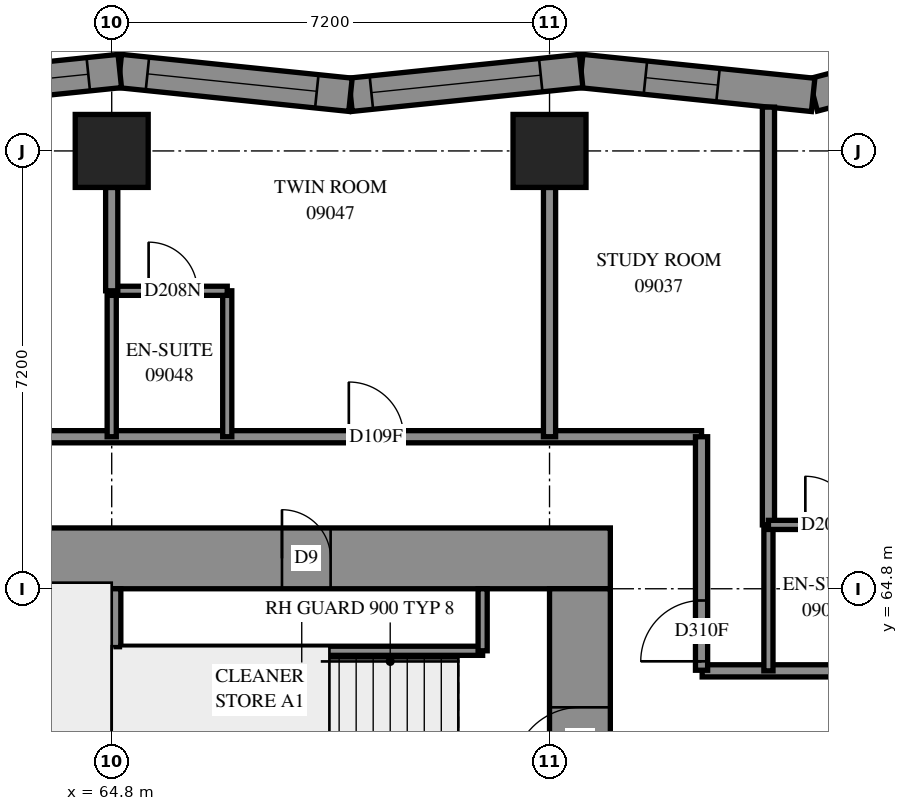
"""IFC4 building model, lengths in metres.
Left out: names, types, materials, properties, quantities, classifications, styles, units other than length and angle.
Written with IfcOpenShell. Run it as: python <this file> out.ifc"""

import sys

from ifc_helpers import new_model, si_unit, direction, frame, frame_2d, origin, origin_2d, place, context, subcontext, project, spatial, polyline, rectangle, outline, extrude, element, fill, save


model = new_model("IFC4")
c1 = context("Model", 3, precision=1e-05, world=origin(), true_north=direction((0.0, 1.0)))
c2 = subcontext(c1, "Body", "Model", "MODEL_VIEW")
j1 = project(units=[si_unit("LENGTHUNIT", "METRE"), si_unit("PLANEANGLEUNIT", "RADIAN")], contexts=[c1])
p1 = place(None, origin())
s1 = spatial("IfcSite", under=j1, at=p1, CompositionType="ELEMENT")
p2 = place(p1, origin())
s2 = spatial("IfcBuilding", under=s1, at=p2, CompositionType="ELEMENT")
p3 = place(p2, frame((0.0, 0.0, 37.2)))
s3 = spatial("IfcBuildingStorey", under=s2, at=p3, CompositionType="ELEMENT", Elevation=37.2)
for number, where, z_axis, x_axis in (
    (1, (64.8, 72.0, 0.0), (0.0, 0.0, 1.0), (1.0, 0.0, 0.0)),
    (2, (72.0, 72.0, 0.0), (0.0, 0.0, 1.0), (1.0, 0.0, 0.0)),
):
    element("IfcColumn", number, at=place(p3, frame(where, z_axis=z_axis, x_axis=x_axis)), inside=s3, PredefinedType="COLUMN", context=c2, shape_type="SweptSolid", body=[
        extrude(rectangle(XDim=1.2, YDim=1.2, at=origin_2d()), origin(), (0.0, 0.0, 1.0), 3.1),
    ])
p4 = place(p3, frame((56.6, 65.3, -0.3), z_axis=(0.0, 0.0, 1.0), x_axis=(1.0, 0.0, 0.0)))
e3 = element("IfcWall", 3, at=p4, inside=s3, PredefinedType="SHEAR", context=c2, shape_type="SweptSolid", body=[
    extrude(rectangle(XDim=16.4, YDim=1.0, at=frame_2d((8.2, 0.0))), origin(), (0.0, 0.0, 1.0), 2.7),
])
p5 = place(p4, frame((11.0, 0.0, 0.3)))
e4 = element("IfcOpeningElement", 4, at=p5, cuts=e3, PredefinedType="OPENING", context=c2, shape_type="SweptSolid", body=[
    extrude(rectangle(XDim=0.8, YDim=2.1, at=frame_2d((0.4, 1.05))), frame((0.0, 0.51, 0.0), z_axis=(0.0, -1.0, 0.0), x_axis=(1.0, 0.0, 0.0)), (0.0, 0.0, 1.0), 1.02),
])
p6 = place(p3, frame((72.5, 50.4, -0.3), z_axis=(0.0, 0.0, 1.0), x_axis=(0.0, 1.0, 0.0)))
e5 = element("IfcWall", 5, at=p6, inside=s3, PredefinedType="SHEAR", context=c2, shape_type="SweptSolid", body=[
    extrude(rectangle(XDim=14.4, YDim=1.0, at=frame_2d((7.2, 0.0))), origin(), (0.0, 0.0, 1.0), 2.7),
])
p7 = place(p6, frame((4.55, 0.0, 0.3)))
e6 = element("IfcOpeningElement", 6, at=p7, cuts=e5, PredefinedType="OPENING", context=c2, shape_type="SweptSolid", body=[
    extrude(rectangle(XDim=1.1, YDim=2.1, at=frame_2d((0.55, 1.05))), frame((0.0, 0.51, 0.0), z_axis=(0.0, -1.0, 0.0), x_axis=(1.0, 0.0, 0.0)), (0.0, 0.0, 1.0), 1.02),
])
p8 = place(p6, frame((11.35, 0.0, 0.3)))
e7 = element("IfcOpeningElement", 7, at=p8, cuts=e5, PredefinedType="OPENING", context=c2, shape_type="SweptSolid", body=[
    extrude(rectangle(XDim=1.1, YDim=2.1, at=frame_2d((0.55, 1.05))), frame((0.0, 0.51, 0.0), z_axis=(0.0, -1.0, 0.0), x_axis=(1.0, 0.0, 0.0)), (0.0, 0.0, 1.0), 1.02),
])
p9 = place(p3, frame((64.8, 60.6, 0.0), z_axis=(0.0, 0.0, 1.0), x_axis=(0.0, 1.0, 0.0)))
e8 = element("IfcWall", 8, at=p9, inside=s3, PredefinedType="SOLIDWALL", context=c2, shape_type="SweptSolid", body=[
    extrude(rectangle(XDim=4.2, YDim=0.3, at=frame_2d((2.1, 0.0))), origin(), (0.0, 0.0, 1.0), 3.1),
])
p10 = place(p3, frame((79.97, 73.871, 0.0), z_axis=(0.0, 0.0, 1.0), x_axis=(-0.9675284554, -0.2527621176, 0.0)))
e9 = element("IfcWall", 9, at=p10, inside=s3, PredefinedType="SOLIDWALL", context=c2, shape_type="SweptSolid", body=[
    extrude(outline(polyline([(-0.214, -0.275), (3.707, -0.275), (3.807, 0.275), (0.214, 0.275), (-0.214, -0.275)])), origin(), (0.0, 0.0, 1.0), 3.1),
])
p11 = place(p10, frame((1.576, 0.0, 0.5)))
e10 = element("IfcOpeningElement", 10, at=p11, cuts=e9, PredefinedType="OPENING", context=c2, shape_type="SweptSolid", body=[
    extrude(rectangle(XDim=1.2, YDim=2.45, at=frame_2d((0.6, 1.225))), frame((0.0, 0.285, 0.0), z_axis=(0.0, -1.0, 0.0), x_axis=(1.0, 0.0, 0.0)), (0.0, 0.0, 1.0), 0.57),
])
p12 = place(p3, frame((76.335, 72.921, 0.0), z_axis=(0.0, 0.0, 1.0), x_axis=(-0.9947305582, 0.1025237367, 0.0)))
e11 = element("IfcWall", 11, at=p12, inside=s3, PredefinedType="SOLIDWALL", context=c2, shape_type="SweptSolid", body=[
    extrude(outline(polyline([(0.05, -0.275), (3.864, -0.275), (3.807, 0.275), (-0.05, 0.275), (0.05, -0.275)])), origin(), (0.0, 0.0, 1.0), 3.1),
])
p13 = place(p12, frame((1.573, 0.0, 0.5)))
e12 = element("IfcOpeningElement", 12, at=p13, cuts=e11, PredefinedType="OPENING", context=c2, shape_type="SweptSolid", body=[
    extrude(rectangle(XDim=1.2, YDim=2.45, at=frame_2d((0.6, 1.225))), frame((0.0, 0.285, 0.0), z_axis=(0.0, -1.0, 0.0), x_axis=(1.0, 0.0, 0.0)), (0.0, 0.0, 1.0), 0.57),
])
p14 = place(p3, frame((72.52, 73.314, 0.0), z_axis=(0.0, 0.0, 1.0), x_axis=(-0.9947306832, -0.1025225234, 0.0)))
e13 = element("IfcWall", 13, at=p14, inside=s3, PredefinedType="SOLIDWALL", context=c2, shape_type="SweptSolid", body=[
    extrude(outline(polyline([(-0.028, -0.275), (3.785, -0.275), (3.842, 0.275), (0.028, 0.275), (-0.028, -0.275)])), origin(), (0.0, 0.0, 1.0), 3.1),
])
p15 = place(p14, frame((0.668, 0.0, 0.5)))
e14 = element("IfcOpeningElement", 14, at=p15, cuts=e13, PredefinedType="OPENING", context=c2, shape_type="SweptSolid", body=[
    extrude(rectangle(XDim=2.8, YDim=2.45, at=frame_2d((1.4, 1.225))), frame((0.0, 0.285, 0.0), z_axis=(0.0, -1.0, 0.0), x_axis=(1.0, 0.0, 0.0)), (0.0, 0.0, 1.0), 0.57),
])
p16 = place(p3, frame((68.727, 72.924, 0.0), z_axis=(0.0, 0.0, 1.0), x_axis=(-0.9947306832, 0.1025225234, 0.0)))
e15 = element("IfcWall", 15, at=p16, inside=s3, PredefinedType="SOLIDWALL", context=c2, shape_type="SweptSolid", body=[
    extrude(outline(polyline([(0.028, -0.275), (3.842, -0.275), (3.785, 0.275), (-0.028, 0.275), (0.028, -0.275)])), origin(), (0.0, 0.0, 1.0), 3.1),
])
p17 = place(p16, frame((0.557, 0.0, 0.5)))
e16 = element("IfcOpeningElement", 16, at=p17, cuts=e15, PredefinedType="OPENING", context=c2, shape_type="SweptSolid", body=[
    extrude(rectangle(XDim=2.8, YDim=2.45, at=frame_2d((1.4, 1.225))), frame((0.0, 0.285, 0.0), z_axis=(0.0, -1.0, 0.0), x_axis=(1.0, 0.0, 0.0)), (0.0, 0.0, 1.0), 0.57),
])
p18 = place(p3, frame((64.933, 73.314, 0.0), z_axis=(0.0, 0.0, 1.0), x_axis=(-0.9947304076, -0.1025251975, 0.0)))
e17 = element("IfcWall", 17, at=p18, inside=s3, PredefinedType="SOLIDWALL", context=c2, shape_type="SweptSolid", body=[
    extrude(outline(polyline([(-0.028, -0.275), (3.785, -0.275), (3.842, 0.275), (0.028, 0.275), (-0.028, -0.275)])), origin(), (0.0, 0.0, 1.0), 3.1),
])
p19 = place(p18, frame((0.521, 0.0, 0.5)))
e18 = element("IfcOpeningElement", 18, at=p19, cuts=e17, PredefinedType="OPENING", context=c2, shape_type="SweptSolid", body=[
    extrude(rectangle(XDim=2.8, YDim=2.45, at=frame_2d((1.4, 1.225))), frame((0.0, 0.285, 0.0), z_axis=(0.0, -1.0, 0.0), x_axis=(1.0, 0.0, 0.0)), (0.0, 0.0, 1.0), 0.57),
])
p20 = place(p3, frame((64.95, 63.78, 0.0), z_axis=(0.0, 0.0, 1.0), x_axis=(1.0, 0.0, 0.0)))
e19 = element("IfcWall", 19, at=p20, inside=s3, PredefinedType="PARTITIONING", context=c2, shape_type="SweptSolid", body=[
    extrude(rectangle(XDim=5.95, YDim=0.15, at=frame_2d((2.975, 0.0))), origin(), (0.0, 0.0, 1.0), 3.1),
])
p21 = place(p3, frame((70.9, 63.78, 0.0), z_axis=(0.0, 0.0, 1.0), x_axis=(0.0, 1.0, 0.0)))
e20 = element("IfcWall", 20, at=p21, inside=s3, PredefinedType="PARTITIONING", context=c2, shape_type="SweptSolid", body=[
    extrude(rectangle(XDim=1.02, YDim=0.15, at=frame_2d((0.51, 0.0))), origin(), (0.0, 0.0, 1.0), 3.1),
])
p22 = place(p3, frame((55.1, 67.3, 0.0), z_axis=(0.0, 0.0, 1.0), x_axis=(1.0, 0.0, 0.0)))
e21 = element("IfcWall", 21, at=p22, inside=s3, PredefinedType="PARTITIONING", context=c2, shape_type="SweptSolid", body=[
    extrude(rectangle(XDim=19.4, YDim=0.2, at=frame_2d((9.7, 0.0))), origin(), (0.0, 0.0, 1.0), 3.1),
])
p23 = place(p22, frame((6.399, 0.0, 0.0)))
e22 = element("IfcOpeningElement", 22, at=p23, cuts=e21, PredefinedType="OPENING", context=c2, shape_type="SweptSolid", body=[
    extrude(rectangle(XDim=0.9, YDim=2.1, at=frame_2d((0.45, 1.05))), frame((0.0, 0.11, 0.0), z_axis=(0.0, -1.0, 0.0), x_axis=(1.0, 0.0, 0.0)), (0.0, 0.0, 1.0), 0.22),
])
p24 = place(p22, frame((13.599, 0.0, 0.0)))
e23 = element("IfcOpeningElement", 23, at=p24, cuts=e21, PredefinedType="OPENING", context=c2, shape_type="SweptSolid", body=[
    extrude(rectangle(XDim=0.9, YDim=2.1, at=frame_2d((0.45, 1.05))), frame((0.0, 0.11, 0.0), z_axis=(0.0, -1.0, 0.0), x_axis=(1.0, 0.0, 0.0)), (0.0, 0.0, 1.0), 0.22),
])
p25 = place(p3, frame((75.6, 65.85, 0.0), z_axis=(0.0, 0.0, 1.0), x_axis=(0.0, 1.0, 0.0)))
e24 = element("IfcWall", 24, at=p25, inside=s3, PredefinedType="PARTITIONING", context=c2, shape_type="SweptSolid", body=[
    extrude(rectangle(XDim=6.871, YDim=0.2, at=frame_2d((3.435, 0.0))), origin(), (0.0, 0.0, 1.0), 3.1),
])
p26 = place(p3, frame((74.51, 63.45, 0.0), z_axis=(0.0, 0.0, 1.0), x_axis=(1.0, 0.0, 0.0)))
e25 = element("IfcWall", 25, at=p26, inside=s3, PredefinedType="PARTITIONING", context=c2, shape_type="SweptSolid", body=[
    extrude(rectangle(XDim=4.69, YDim=0.2, at=frame_2d((2.345, 0.0))), origin(), (0.0, 0.0, 1.0), 3.1),
])
p27 = place(p26, frame((3.12, 0.0, 0.0)))
e26 = element("IfcOpeningElement", 26, at=p27, cuts=e25, PredefinedType="OPENING", context=c2, shape_type="SweptSolid", body=[
    extrude(rectangle(XDim=0.9, YDim=2.1, at=frame_2d((0.45, 1.05))), frame((0.0, 0.11, 0.0), z_axis=(0.0, -1.0, 0.0), x_axis=(1.0, 0.0, 0.0)), (0.0, 0.0, 1.0), 0.22),
])
p28 = place(p3, frame((72.0, 67.3, 0.0), z_axis=(0.0, 0.0, 1.0), x_axis=(0.0, 1.0, 0.0)))
e27 = element("IfcWall", 27, at=p28, inside=s3, PredefinedType="PARTITIONING", context=c2, shape_type="SweptSolid", body=[
    extrude(rectangle(XDim=4.1, YDim=0.2, at=frame_2d((2.05, 0.0))), origin(), (0.0, 0.0, 1.0), 3.1),
])
p29 = place(p3, frame((74.5, 63.46, 0.0), z_axis=(0.0, 0.0, 1.0), x_axis=(0.0, 1.0, 0.0)))
e28 = element("IfcWall", 28, at=p29, inside=s3, PredefinedType="PARTITIONING", context=c2, shape_type="SweptSolid", body=[
    extrude(rectangle(XDim=3.84, YDim=0.2, at=frame_2d((1.92, 0.0))), origin(), (0.0, 0.0, 1.0), 3.1),
])
p30 = place(p29, frame((0.147, 0.0, 0.0)))
e29 = element("IfcOpeningElement", 29, at=p30, cuts=e28, PredefinedType="OPENING", context=c2, shape_type="SweptSolid", body=[
    extrude(rectangle(XDim=1.0, YDim=2.1, at=frame_2d((0.5, 1.05))), frame((0.0, 0.11, 0.0), z_axis=(0.0, -1.0, 0.0), x_axis=(1.0, 0.0, 0.0)), (0.0, 0.0, 1.0), 0.22),
])
for number, where, z_axis, x_axis in (
    (30, (66.7, 67.3, 0.0), (0.0, 0.0, 1.0), (0.0, 1.0, 0.0)),
    (31, (64.8, 67.3, 0.0), (0.0, 0.0, 1.0), (0.0, 1.0, 0.0)),
    (32, (75.6, 63.45, 0.0), (0.0, 0.0, 1.0), (0.0, 1.0, 0.0)),
):
    element("IfcWall", number, at=place(p3, frame(where, z_axis=z_axis, x_axis=x_axis)), inside=s3, PredefinedType="PARTITIONING", context=c2, shape_type="SweptSolid", body=[
        extrude(rectangle(XDim=2.4, YDim=0.15, at=frame_2d((1.2, 0.0))), origin(), (0.0, 0.0, 1.0), 3.1),
    ])
p31 = place(p3, frame((75.6, 65.85, 0.0), z_axis=(0.0, 0.0, 1.0), x_axis=(1.0, 0.0, 0.0)))
e33 = element("IfcWall", 33, at=p31, inside=s3, PredefinedType="PARTITIONING", context=c2, shape_type="SweptSolid", body=[
    extrude(rectangle(XDim=1.9, YDim=0.15, at=frame_2d((0.95, 0.0))), origin(), (0.0, 0.0, 1.0), 3.1),
])
p32 = place(p31, frame((0.607, 0.0, 0.0)))
e34 = element("IfcOpeningElement", 34, at=p32, cuts=e33, PredefinedType="OPENING", context=c2, shape_type="SweptSolid", body=[
    extrude(rectangle(XDim=0.8, YDim=2.1, at=frame_2d((0.4, 1.05))), frame((0.0, 0.085, 0.0), z_axis=(0.0, -1.0, 0.0), x_axis=(1.0, 0.0, 0.0)), (0.0, 0.0, 1.0), 0.17),
])
p33 = place(p3, frame((64.8, 69.7, 0.0), z_axis=(0.0, 0.0, 1.0), x_axis=(1.0, 0.0, 0.0)))
e35 = element("IfcWall", 35, at=p33, inside=s3, PredefinedType="PARTITIONING", context=c2, shape_type="SweptSolid", body=[
    extrude(rectangle(XDim=1.9, YDim=0.15, at=frame_2d((0.95, 0.0))), origin(), (0.0, 0.0, 1.0), 3.1),
])
p34 = place(p33, frame((0.607, 0.0, 0.0)))
e36 = element("IfcOpeningElement", 36, at=p34, cuts=e35, PredefinedType="OPENING", context=c2, shape_type="SweptSolid", body=[
    extrude(rectangle(XDim=0.8, YDim=2.1, at=frame_2d((0.4, 1.05))), frame((0.0, 0.085, 0.0), z_axis=(0.0, -1.0, 0.0), x_axis=(1.0, 0.0, 0.0)), (0.0, 0.0, 1.0), 0.17),
])
p35 = place(p3, frame((64.8, 69.7, 0.0), z_axis=(0.0, 0.0, 1.0), x_axis=(0.0, 1.0, 0.0)))
e37 = element("IfcWall", 37, at=p35, inside=s3, PredefinedType="PARTITIONING", context=c2, shape_type="SweptSolid", body=[
    extrude(rectangle(XDim=1.7, YDim=0.2, at=frame_2d((0.85, 0.0))), origin(), (0.0, 0.0, 1.0), 3.1),
])
p36 = place(p13, origin())
e38 = element("IfcWindow", 38, at=p36, inside=s3, PartitioningType="SINGLE_PANEL", PredefinedType="WINDOW", context=c2, shape_type="SweptSolid", body=[
    extrude(rectangle(XDim=1.2, YDim=2.45, at=frame_2d((0.6, 1.225))), frame((0.0, 0.155, 0.0), z_axis=(0.0, -1.0, 0.0), x_axis=(1.0, 0.0, 0.0)), (0.0, 0.0, 1.0), 0.06),
])
fill(e12, e38)
p37 = place(p15, origin())
e39 = element("IfcWindow", 39, at=p37, inside=s3, PartitioningType="SINGLE_PANEL", PredefinedType="WINDOW", context=c2, shape_type="SweptSolid", body=[
    extrude(rectangle(XDim=2.8, YDim=2.45, at=frame_2d((1.4, 1.225))), frame((0.0, 0.155, 0.0), z_axis=(0.0, -1.0, 0.0), x_axis=(1.0, 0.0, 0.0)), (0.0, 0.0, 1.0), 0.06),
])
fill(e14, e39)
p38 = place(p17, origin())
e40 = element("IfcWindow", 40, at=p38, inside=s3, PartitioningType="SINGLE_PANEL", PredefinedType="WINDOW", context=c2, shape_type="SweptSolid", body=[
    extrude(rectangle(XDim=2.8, YDim=2.45, at=frame_2d((1.4, 1.225))), frame((0.0, 0.155, 0.0), z_axis=(0.0, -1.0, 0.0), x_axis=(1.0, 0.0, 0.0)), (0.0, 0.0, 1.0), 0.06),
])
fill(e16, e40)
p39 = place(p19, origin())
e41 = element("IfcWindow", 41, at=p39, inside=s3, PartitioningType="SINGLE_PANEL", PredefinedType="WINDOW", context=c2, shape_type="SweptSolid", body=[
    extrude(rectangle(XDim=2.8, YDim=2.45, at=frame_2d((1.4, 1.225))), frame((0.0, 0.155, 0.0), z_axis=(0.0, -1.0, 0.0), x_axis=(1.0, 0.0, 0.0)), (0.0, 0.0, 1.0), 0.06),
])
fill(e18, e41)
p40 = place(p5, origin())
e42 = element("IfcDoor", 42, at=p40, inside=s3, OperationType="SINGLE_SWING_RIGHT", PredefinedType="DOOR", context=c2, shape_type="SweptSolid", body=[
    extrude(rectangle(XDim=0.8, YDim=2.1, at=frame_2d((0.4, 1.05))), frame((0.0, -0.44, 0.0), z_axis=(0.0, -1.0, 0.0), x_axis=(1.0, 0.0, 0.0)), (0.0, 0.0, 1.0), 0.05),
])
fill(e4, e42)
p41 = place(p8, origin())
e43 = element("IfcDoor", 43, at=p41, inside=s3, OperationType="SINGLE_SWING_RIGHT", PredefinedType="DOOR", context=c2, shape_type="SweptSolid", body=[
    extrude(rectangle(XDim=1.1, YDim=2.1, at=frame_2d((0.55, 1.05))), frame((0.0, 0.025, 0.0), z_axis=(0.0, -1.0, 0.0), x_axis=(1.0, 0.0, 0.0)), (0.0, 0.0, 1.0), 0.05),
])
fill(e7, e43)
p42 = place(p30, origin())
e44 = element("IfcDoor", 44, at=p42, inside=s3, OperationType="SINGLE_SWING_RIGHT", PredefinedType="DOOR", context=c2, shape_type="SweptSolid", body=[
    extrude(rectangle(XDim=1.0, YDim=2.1, at=frame_2d((0.5, 1.05))), frame((0.0, 0.025, 0.0), z_axis=(0.0, -1.0, 0.0), x_axis=(1.0, 0.0, 0.0)), (0.0, 0.0, 1.0), 0.05),
])
fill(e29, e44)
p43 = place(p32, origin())
e45 = element("IfcDoor", 45, at=p43, inside=s3, OperationType="SINGLE_SWING_RIGHT", PredefinedType="DOOR", context=c2, shape_type="SweptSolid", body=[
    extrude(rectangle(XDim=0.8, YDim=2.1, at=frame_2d((0.4, 1.05))), frame((0.0, 0.025, 0.0), z_axis=(0.0, -1.0, 0.0), x_axis=(1.0, 0.0, 0.0)), (0.0, 0.0, 1.0), 0.05),
])
fill(e34, e45)
p44 = place(p24, origin())
e46 = element("IfcDoor", 46, at=p44, inside=s3, OperationType="SINGLE_SWING_RIGHT", PredefinedType="DOOR", context=c2, shape_type="SweptSolid", body=[
    extrude(rectangle(XDim=0.9, YDim=2.1, at=frame_2d((0.45, 1.05))), frame((0.0, 0.025, 0.0), z_axis=(0.0, -1.0, 0.0), x_axis=(1.0, 0.0, 0.0)), (0.0, 0.0, 1.0), 0.05),
])
fill(e23, e46)
p45 = place(p34, origin())
e47 = element("IfcDoor", 47, at=p45, inside=s3, OperationType="SINGLE_SWING_RIGHT", PredefinedType="DOOR", context=c2, shape_type="SweptSolid", body=[
    extrude(rectangle(XDim=0.8, YDim=2.1, at=frame_2d((0.4, 1.05))), frame((0.0, 0.025, 0.0), z_axis=(0.0, -1.0, 0.0), x_axis=(1.0, 0.0, 0.0)), (0.0, 0.0, 1.0), 0.05),
])
fill(e36, e47)
save(model, sys.argv[1])
